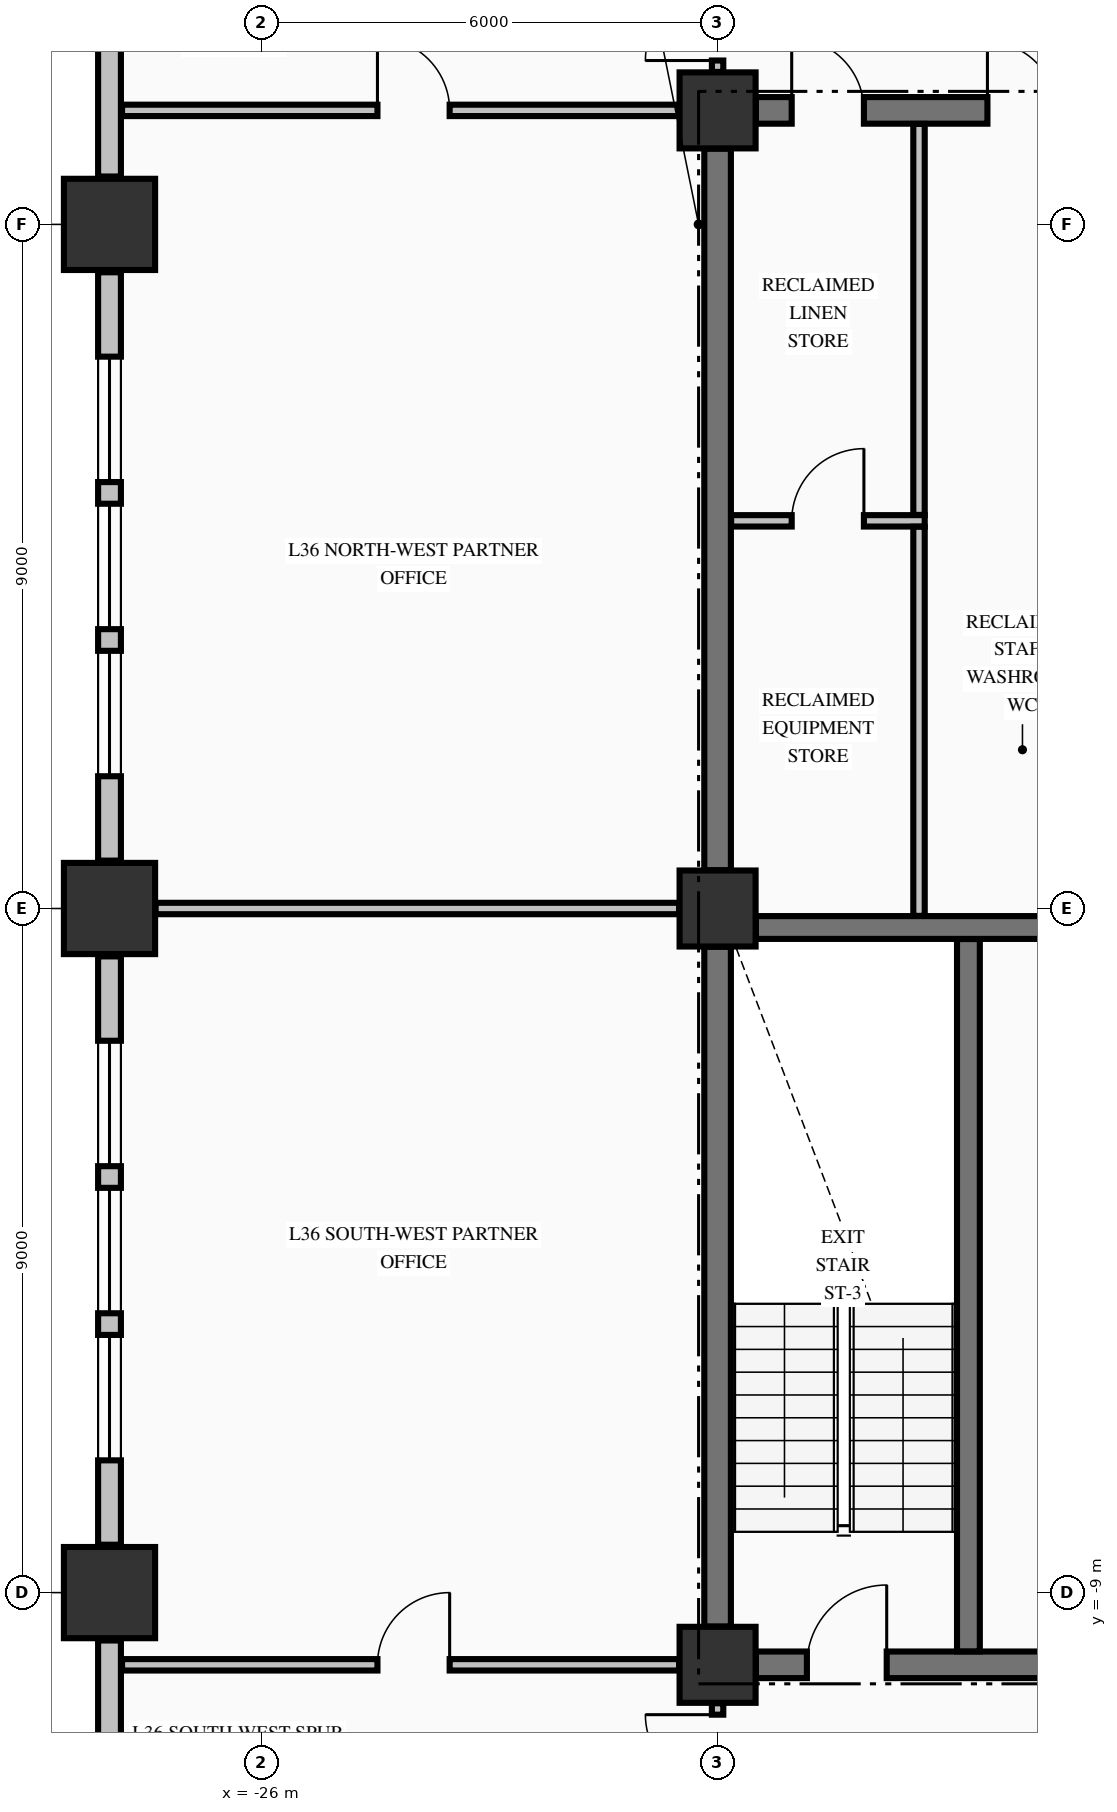
"""IFC4 building model, lengths in metres.
Left out: names, types, materials, properties, quantities, classifications, styles, units other than length and angle.
Written with IfcOpenShell. Run it as: python <this file> out.ifc"""

import sys

from ifc_helpers import new_model, si_unit, direction, frame, frame_2d, origin, origin_2d, place, context, subcontext, project, spatial, rectangle, extrude, element, fill, save


model = new_model("IFC4")
c1 = context("Model", 3, precision=1e-05, world=origin(), true_north=direction((0.0, 1.0)))
c2 = subcontext(c1, "Body", "Model", "MODEL_VIEW")
j1 = project(units=[si_unit("LENGTHUNIT", "METRE"), si_unit("PLANEANGLEUNIT", "RADIAN")], contexts=[c1])
p1 = place(None, origin())
s1 = spatial("IfcSite", under=j1, at=p1, CompositionType="ELEMENT")
p2 = place(p1, origin())
s2 = spatial("IfcBuilding", under=s1, at=p2, CompositionType="ELEMENT")
p3 = place(p2, frame((0.0, 0.0, 142.77)))
s3 = spatial("IfcBuildingStorey", under=s2, at=p3, CompositionType="ELEMENT", Elevation=142.77)
for number, where, z_axis, x_axis in (
    (1, (-28.0, -9.0, -0.325), (0.0, 0.0, 1.0), (1.0, 0.0, 0.0)),
    (2, (-28.0, 0.0, -0.325), (0.0, 0.0, 1.0), (1.0, 0.0, 0.0)),
    (3, (-28.0, 9.0, -0.325), (0.0, 0.0, 1.0), (1.0, 0.0, 0.0)),
):
    element("IfcColumn", number, at=place(p3, frame(where, z_axis=z_axis, x_axis=x_axis)), inside=s3, PredefinedType="COLUMN", context=c2, shape_type="SweptSolid", body=[
        extrude(rectangle(XDim=1.2, YDim=1.2, at=origin_2d()), origin(), (0.0, 0.0, 1.0), 3.645),
    ])
for number, where, z_axis, x_axis in (
    (4, (-20.0, -9.95, -0.325), (0.0, 0.0, 1.0), (1.0, 0.0, 0.0)),
    (5, (-20.0, 10.5, -0.325), (0.0, 0.0, 1.0), (1.0, 0.0, 0.0)),
    (6, (-20.0, 0.0, -0.325), (0.0, 0.0, 1.0), (1.0, 0.0, 0.0)),
):
    element("IfcColumn", number, at=place(p3, frame(where, z_axis=z_axis, x_axis=x_axis)), inside=s3, PredefinedType="COLUMN", context=c2, shape_type="SweptSolid", body=[
        extrude(rectangle(XDim=1.0, YDim=1.0, at=origin_2d()), origin(), (0.0, 0.0, 1.0), 3.645),
    ])
p4 = place(p3, frame((-28.0, -9.63, 0.0), z_axis=(0.0, 0.0, 1.0), x_axis=(0.0, -1.0, 0.0)))
e7 = element("IfcWall", 7, at=p4, inside=s3, PredefinedType="STANDARD", context=c2, shape_type="SweptSolid", body=[
    extrude(rectangle(XDim=10.74, YDim=0.3, at=frame_2d((5.37, 0.0))), origin(), (0.0, 0.0, 1.0), 2.712),
])
p5 = place(p3, frame((-28.0, -0.63, 0.0), z_axis=(0.0, 0.0, 1.0), x_axis=(0.0, -1.0, 0.0)))
e8 = element("IfcWall", 8, at=p5, inside=s3, PredefinedType="STANDARD", context=c2, shape_type="SweptSolid", body=[
    extrude(rectangle(XDim=7.74, YDim=0.3, at=frame_2d((3.87, 0.0))), origin(), (0.0, 0.0, 1.0), 2.712),
])
p6 = place(p5, frame((1.11, 0.0, 0.8)))
e9 = element("IfcOpeningElement", 9, at=p6, cuts=e8, PredefinedType="OPENING", context=c2, shape_type="SweptSolid", body=[
    extrude(rectangle(XDim=1.65, YDim=1.7, at=frame_2d((0.825, 0.85))), frame((0.0, 0.16, 0.0), z_axis=(0.0, -1.0, 0.0), x_axis=(1.0, 0.0, 0.0)), (0.0, 0.0, 1.0), 0.32),
])
p7 = place(p5, frame((3.045, 0.0, 0.8)))
e10 = element("IfcOpeningElement", 10, at=p7, cuts=e8, PredefinedType="OPENING", context=c2, shape_type="SweptSolid", body=[
    extrude(rectangle(XDim=1.65, YDim=1.7, at=frame_2d((0.825, 0.85))), frame((0.0, 0.16, 0.0), z_axis=(0.0, -1.0, 0.0), x_axis=(1.0, 0.0, 0.0)), (0.0, 0.0, 1.0), 0.32),
])
p8 = place(p5, frame((4.98, 0.0, 0.8)))
e11 = element("IfcOpeningElement", 11, at=p8, cuts=e8, PredefinedType="OPENING", context=c2, shape_type="SweptSolid", body=[
    extrude(rectangle(XDim=1.65, YDim=1.7, at=frame_2d((0.825, 0.85))), frame((0.0, 0.16, 0.0), z_axis=(0.0, -1.0, 0.0), x_axis=(1.0, 0.0, 0.0)), (0.0, 0.0, 1.0), 0.32),
])
p9 = place(p3, frame((-28.0, 8.37, 0.0), z_axis=(0.0, 0.0, 1.0), x_axis=(0.0, -1.0, 0.0)))
e12 = element("IfcWall", 12, at=p9, inside=s3, PredefinedType="STANDARD", context=c2, shape_type="SweptSolid", body=[
    extrude(rectangle(XDim=7.74, YDim=0.3, at=frame_2d((3.87, 0.0))), origin(), (0.0, 0.0, 1.0), 2.712),
])
p10 = place(p9, frame((1.11, 0.0, 0.8)))
e13 = element("IfcOpeningElement", 13, at=p10, cuts=e12, PredefinedType="OPENING", context=c2, shape_type="SweptSolid", body=[
    extrude(rectangle(XDim=1.65, YDim=1.7, at=frame_2d((0.825, 0.85))), frame((0.0, 0.16, 0.0), z_axis=(0.0, -1.0, 0.0), x_axis=(1.0, 0.0, 0.0)), (0.0, 0.0, 1.0), 0.32),
])
p11 = place(p9, frame((3.045, 0.0, 0.8)))
e14 = element("IfcOpeningElement", 14, at=p11, cuts=e12, PredefinedType="OPENING", context=c2, shape_type="SweptSolid", body=[
    extrude(rectangle(XDim=1.65, YDim=1.7, at=frame_2d((0.825, 0.85))), frame((0.0, 0.16, 0.0), z_axis=(0.0, -1.0, 0.0), x_axis=(1.0, 0.0, 0.0)), (0.0, 0.0, 1.0), 0.32),
])
p12 = place(p9, frame((4.98, 0.0, 0.8)))
e15 = element("IfcOpeningElement", 15, at=p12, cuts=e12, PredefinedType="OPENING", context=c2, shape_type="SweptSolid", body=[
    extrude(rectangle(XDim=1.65, YDim=1.7, at=frame_2d((0.825, 0.85))), frame((0.0, 0.16, 0.0), z_axis=(0.0, -1.0, 0.0), x_axis=(1.0, 0.0, 0.0)), (0.0, 0.0, 1.0), 0.32),
])
p13 = place(p3, frame((-28.0, 20.37, 0.0), z_axis=(0.0, 0.0, 1.0), x_axis=(0.0, -1.0, 0.0)))
e16 = element("IfcWall", 16, at=p13, inside=s3, PredefinedType="STANDARD", context=c2, shape_type="SweptSolid", body=[
    extrude(rectangle(XDim=10.74, YDim=0.3, at=frame_2d((5.37, 0.0))), origin(), (0.0, 0.0, 1.0), 2.712),
])
p14 = place(p3, frame((-19.496, -9.95, 0.0), z_axis=(0.0, 0.0, 1.0), x_axis=(1.0, 0.0, 0.0)))
e17 = element("IfcWall", 17, at=p14, inside=s3, PredefinedType="SHEAR", context=c2, shape_type="SweptSolid", body=[
    extrude(rectangle(XDim=4.796, YDim=0.35, at=frame_2d((2.398, 0.0))), origin(), (0.0, 0.0, 1.0), 3.32),
])
p15 = place(p14, frame((0.671, 0.0, 0.0)))
e18 = element("IfcOpeningElement", 18, at=p15, cuts=e17, PredefinedType="OPENING", context=c2, shape_type="SweptSolid", body=[
    extrude(rectangle(XDim=1.05, YDim=2.15, at=frame_2d((0.525, 1.075))), frame((0.0, 0.185, 0.0), z_axis=(0.0, -1.0, 0.0), x_axis=(1.0, 0.0, 0.0)), (0.0, 0.0, 1.0), 0.37),
])
p16 = place(p3, frame((-19.496, -0.25, 0.0), z_axis=(0.0, 0.0, 1.0), x_axis=(1.0, 0.0, 0.0)))
e19 = element("IfcWall", 19, at=p16, inside=s3, PredefinedType="SHEAR", context=c2, shape_type="SweptSolid", body=[
    extrude(rectangle(XDim=7.992, YDim=0.3, at=frame_2d((3.996, 0.0))), origin(), (0.0, 0.0, 1.0), 3.32),
])
p17 = place(p16, frame((5.796, 0.0, 0.0)))
e20 = element("IfcOpeningElement", 20, at=p17, cuts=e19, PredefinedType="OPENING", context=c2, shape_type="SweptSolid", body=[
    extrude(rectangle(XDim=1.1, YDim=2.15, at=frame_2d((0.55, 1.075))), frame((0.0, 0.16, 0.0), z_axis=(0.0, -1.0, 0.0), x_axis=(1.0, 0.0, 0.0)), (0.0, 0.0, 1.0), 0.32),
])
p18 = place(p3, frame((-19.496, 10.5, 0.0), z_axis=(0.0, 0.0, 1.0), x_axis=(1.0, 0.0, 0.0)))
e21 = element("IfcWall", 21, at=p18, inside=s3, PredefinedType="SHEAR", context=c2, shape_type="SweptSolid", body=[
    extrude(rectangle(XDim=4.796, YDim=0.35, at=frame_2d((2.398, 0.0))), origin(), (0.0, 0.0, 1.0), 3.32),
])
p19 = place(p18, frame((0.471, 0.0, 0.0)))
e22 = element("IfcOpeningElement", 22, at=p19, cuts=e21, PredefinedType="OPENING", context=c2, shape_type="SweptSolid", body=[
    extrude(rectangle(XDim=0.95, YDim=2.15, at=frame_2d((0.475, 1.075))), frame((0.0, 0.185, 0.0), z_axis=(0.0, -1.0, 0.0), x_axis=(1.0, 0.0, 0.0)), (0.0, 0.0, 1.0), 0.37),
])
p20 = place(p18, frame((3.046, 0.0, 0.0)))
e23 = element("IfcOpeningElement", 23, at=p20, cuts=e21, PredefinedType="OPENING", context=c2, shape_type="SweptSolid", body=[
    extrude(rectangle(XDim=0.9, YDim=2.15, at=frame_2d((0.45, 1.075))), frame((0.0, 0.185, 0.0), z_axis=(0.0, -1.0, 0.0), x_axis=(1.0, 0.0, 0.0)), (0.0, 0.0, 1.0), 0.37),
])
p21 = place(p3, frame((-27.835, -9.95, 0.0), z_axis=(0.0, 0.0, 1.0), x_axis=(1.0, 0.0, 0.0)))
e24 = element("IfcWall", 24, at=p21, inside=s3, PredefinedType="PARTITIONING", context=c2, shape_type="SweptSolid", body=[
    extrude(rectangle(XDim=7.329, YDim=0.15, at=frame_2d((3.665, 0.0))), origin(), (0.0, 0.0, 1.0), 3.32),
])
p22 = place(p21, frame((3.36, 0.0, 0.0)))
e25 = element("IfcOpeningElement", 25, at=p22, cuts=e24, PredefinedType="OPENING", context=c2, shape_type="SweptSolid", body=[
    extrude(rectangle(XDim=0.95, YDim=2.15, at=frame_2d((0.475, 1.075))), frame((0.0, 0.085, 0.0), z_axis=(0.0, -1.0, 0.0), x_axis=(1.0, 0.0, 0.0)), (0.0, 0.0, 1.0), 0.17),
])
p23 = place(p3, frame((-27.394, 0.0, 0.0), z_axis=(0.0, 0.0, 1.0), x_axis=(1.0, 0.0, 0.0)))
e26 = element("IfcWall", 26, at=p23, inside=s3, PredefinedType="PARTITIONING", context=c2, shape_type="SweptSolid", body=[
    extrude(rectangle(XDim=6.888, YDim=0.15, at=frame_2d((3.444, 0.0))), origin(), (0.0, 0.0, 1.0), 2.81),
])
p24 = place(p3, frame((-19.822, 5.1, 0.0), z_axis=(0.0, 0.0, 1.0), x_axis=(1.0, 0.0, 0.0)))
e27 = element("IfcWall", 27, at=p24, inside=s3, PredefinedType="PARTITIONING", context=c2, shape_type="SweptSolid", body=[
    extrude(rectangle(XDim=2.547, YDim=0.15, at=frame_2d((1.273, 0.0))), origin(), (0.0, 0.0, 1.0), 3.32),
])
p25 = place(p24, frame((0.797, 0.0, 0.0)))
e28 = element("IfcOpeningElement", 28, at=p25, cuts=e27, PredefinedType="OPENING", context=c2, shape_type="SweptSolid", body=[
    extrude(rectangle(XDim=0.95, YDim=2.15, at=frame_2d((0.475, 1.075))), frame((0.0, 0.085, 0.0), z_axis=(0.0, -1.0, 0.0), x_axis=(1.0, 0.0, 0.0)), (0.0, 0.0, 1.0), 0.17),
])
p26 = place(p3, frame((-27.835, 10.5, 0.0), z_axis=(0.0, 0.0, 1.0), x_axis=(1.0, 0.0, 0.0)))
e29 = element("IfcWall", 29, at=p26, inside=s3, PredefinedType="PARTITIONING", context=c2, shape_type="SweptSolid", body=[
    extrude(rectangle(XDim=7.329, YDim=0.15, at=frame_2d((3.665, 0.0))), origin(), (0.0, 0.0, 1.0), 3.32),
])
p27 = place(p26, frame((3.36, 0.0, 0.0)))
e30 = element("IfcOpeningElement", 30, at=p27, cuts=e29, PredefinedType="OPENING", context=c2, shape_type="SweptSolid", body=[
    extrude(rectangle(XDim=0.95, YDim=2.15, at=frame_2d((0.475, 1.075))), frame((0.0, 0.085, 0.0), z_axis=(0.0, -1.0, 0.0), x_axis=(1.0, 0.0, 0.0)), (0.0, 0.0, 1.0), 0.17),
])
p28 = place(p3, frame((-20.0, -9.446, 0.0), z_axis=(0.0, 0.0, 1.0), x_axis=(0.0, 1.0, 0.0)))
e31 = element("IfcWall", 31, at=p28, inside=s3, PredefinedType="SHEAR", context=c2, shape_type="SweptSolid", body=[
    extrude(rectangle(XDim=8.942, YDim=0.35, at=frame_2d((4.471, 0.0))), origin(), (0.0, 0.0, 1.0), 3.32),
])
p29 = place(p3, frame((-20.0, 0.504, 0.0), z_axis=(0.0, 0.0, 1.0), x_axis=(0.0, 1.0, 0.0)))
e32 = element("IfcWall", 32, at=p29, inside=s3, PredefinedType="SHEAR", context=c2, shape_type="SweptSolid", body=[
    extrude(rectangle(XDim=9.492, YDim=0.35, at=frame_2d((4.746, 0.0))), origin(), (0.0, 0.0, 1.0), 3.32),
])
p30 = place(p3, frame((-16.7, -9.773, 0.0), z_axis=(0.0, 0.0, 1.0), x_axis=(0.0, 1.0, 0.0)))
e33 = element("IfcWall", 33, at=p30, inside=s3, PredefinedType="SHEAR", context=c2, shape_type="SweptSolid", body=[
    extrude(rectangle(XDim=9.371, YDim=0.3, at=frame_2d((4.686, 0.0))), origin(), (0.0, 0.0, 1.0), 3.32),
])
p31 = place(p3, frame((-20.0, -12.122, 0.0), z_axis=(0.0, 0.0, 1.0), x_axis=(0.0, 1.0, 0.0)))
e34 = element("IfcWall", 34, at=p31, inside=s3, PredefinedType="PARTITIONING", context=c2, shape_type="SweptSolid", body=[
    extrude(rectangle(XDim=1.666, YDim=0.15, at=frame_2d((0.833, 0.0))), origin(), (0.0, 0.0, 1.0), 2.81),
])
p32 = place(p31, frame((0.566, 0.0, 0.0)))
e35 = element("IfcOpeningElement", 35, at=p32, cuts=e34, PredefinedType="OPENING", context=c2, shape_type="SweptSolid", body=[
    extrude(rectangle(XDim=0.95, YDim=2.15, at=frame_2d((0.475, 1.075))), frame((0.0, 0.085, 0.0), z_axis=(0.0, -1.0, 0.0), x_axis=(1.0, 0.0, 0.0)), (0.0, 0.0, 1.0), 0.17),
])
p33 = place(p3, frame((-20.0, 11.006, 0.0), z_axis=(0.0, 0.0, 1.0), x_axis=(0.0, 1.0, 0.0)))
e36 = element("IfcWall", 36, at=p33, inside=s3, PredefinedType="PARTITIONING", context=c2, shape_type="SweptSolid", body=[
    extrude(rectangle(XDim=1.466, YDim=0.15, at=frame_2d((0.733, 0.0))), origin(), (0.0, 0.0, 1.0), 2.81),
])
p34 = place(p33, frame((0.15, 0.0, 0.0)))
e37 = element("IfcOpeningElement", 37, at=p34, cuts=e36, PredefinedType="OPENING", context=c2, shape_type="SweptSolid", body=[
    extrude(rectangle(XDim=0.95, YDim=2.15, at=frame_2d((0.475, 1.075))), frame((0.0, 0.085, 0.0), z_axis=(0.0, -1.0, 0.0), x_axis=(1.0, 0.0, 0.0)), (0.0, 0.0, 1.0), 0.17),
])
p35 = place(p3, frame((-17.35, -0.097, 0.0), z_axis=(0.0, 0.0, 1.0), x_axis=(0.0, 1.0, 0.0)))
e38 = element("IfcWall", 38, at=p35, inside=s3, PredefinedType="PARTITIONING", context=c2, shape_type="SweptSolid", body=[
    extrude(rectangle(XDim=5.119, YDim=0.15, at=frame_2d((2.56, 0.0))), origin(), (0.0, 0.0, 1.0), 3.32),
])
p36 = place(p3, frame((-17.35, 5.178, 0.0), z_axis=(0.0, 0.0, 1.0), x_axis=(0.0, 1.0, 0.0)))
e39 = element("IfcWall", 39, at=p36, inside=s3, PredefinedType="PARTITIONING", context=c2, shape_type="SweptSolid", body=[
    extrude(rectangle(XDim=5.144, YDim=0.15, at=frame_2d((2.572, 0.0))), origin(), (0.0, 0.0, 1.0), 3.32),
])
p37 = place(p6, origin())
e40 = element("IfcWindow", 40, at=p37, inside=s3, PartitioningType="SINGLE_PANEL", PredefinedType="WINDOW", context=c2, shape_type="SweptSolid", body=[
    extrude(rectangle(XDim=1.65, YDim=1.7, at=frame_2d((0.825, 0.85))), frame((0.0, 0.03, 0.0), z_axis=(0.0, -1.0, 0.0), x_axis=(1.0, 0.0, 0.0)), (0.0, 0.0, 1.0), 0.06),
])
fill(e9, e40)
p38 = place(p7, origin())
e41 = element("IfcWindow", 41, at=p38, inside=s3, PartitioningType="SINGLE_PANEL", PredefinedType="WINDOW", context=c2, shape_type="SweptSolid", body=[
    extrude(rectangle(XDim=1.65, YDim=1.7, at=frame_2d((0.825, 0.85))), frame((0.0, 0.03, 0.0), z_axis=(0.0, -1.0, 0.0), x_axis=(1.0, 0.0, 0.0)), (0.0, 0.0, 1.0), 0.06),
])
fill(e10, e41)
p39 = place(p8, origin())
e42 = element("IfcWindow", 42, at=p39, inside=s3, PartitioningType="SINGLE_PANEL", PredefinedType="WINDOW", context=c2, shape_type="SweptSolid", body=[
    extrude(rectangle(XDim=1.65, YDim=1.7, at=frame_2d((0.825, 0.85))), frame((0.0, 0.03, 0.0), z_axis=(0.0, -1.0, 0.0), x_axis=(1.0, 0.0, 0.0)), (0.0, 0.0, 1.0), 0.06),
])
fill(e11, e42)
p40 = place(p10, origin())
e43 = element("IfcWindow", 43, at=p40, inside=s3, PartitioningType="SINGLE_PANEL", PredefinedType="WINDOW", context=c2, shape_type="SweptSolid", body=[
    extrude(rectangle(XDim=1.65, YDim=1.7, at=frame_2d((0.825, 0.85))), frame((0.0, 0.03, 0.0), z_axis=(0.0, -1.0, 0.0), x_axis=(1.0, 0.0, 0.0)), (0.0, 0.0, 1.0), 0.06),
])
fill(e13, e43)
p41 = place(p11, origin())
e44 = element("IfcWindow", 44, at=p41, inside=s3, PartitioningType="SINGLE_PANEL", PredefinedType="WINDOW", context=c2, shape_type="SweptSolid", body=[
    extrude(rectangle(XDim=1.65, YDim=1.7, at=frame_2d((0.825, 0.85))), frame((0.0, 0.03, 0.0), z_axis=(0.0, -1.0, 0.0), x_axis=(1.0, 0.0, 0.0)), (0.0, 0.0, 1.0), 0.06),
])
fill(e14, e44)
p42 = place(p12, origin())
e45 = element("IfcWindow", 45, at=p42, inside=s3, PartitioningType="SINGLE_PANEL", PredefinedType="WINDOW", context=c2, shape_type="SweptSolid", body=[
    extrude(rectangle(XDim=1.65, YDim=1.7, at=frame_2d((0.825, 0.85))), frame((0.0, 0.03, 0.0), z_axis=(0.0, -1.0, 0.0), x_axis=(1.0, 0.0, 0.0)), (0.0, 0.0, 1.0), 0.06),
])
fill(e15, e45)
p43 = place(p15, origin())
e46 = element("IfcDoor", 46, at=p43, inside=s3, OperationType="SINGLE_SWING_RIGHT", PredefinedType="DOOR", context=c2, shape_type="SweptSolid", body=[
    extrude(rectangle(XDim=1.05, YDim=2.15, at=frame_2d((0.525, 1.075))), frame((0.0, 0.025, 0.0), z_axis=(0.0, -1.0, 0.0), x_axis=(1.0, 0.0, 0.0)), (0.0, 0.0, 1.0), 0.05),
])
fill(e18, e46)
p44 = place(p19, origin())
e47 = element("IfcDoor", 47, at=p44, inside=s3, OperationType="SINGLE_SWING_LEFT", PredefinedType="DOOR", context=c2, shape_type="SweptSolid", body=[
    extrude(rectangle(XDim=0.95, YDim=2.15, at=frame_2d((0.475, 1.075))), frame((0.0, 0.025, 0.0), z_axis=(0.0, -1.0, 0.0), x_axis=(1.0, 0.0, 0.0)), (0.0, 0.0, 1.0), 0.05),
])
fill(e22, e47)
p45 = place(p25, origin())
e48 = element("IfcDoor", 48, at=p45, inside=s3, OperationType="SINGLE_SWING_RIGHT", PredefinedType="DOOR", context=c2, shape_type="SweptSolid", body=[
    extrude(rectangle(XDim=0.95, YDim=2.15, at=frame_2d((0.475, 1.075))), frame((0.0, 0.025, 0.0), z_axis=(0.0, -1.0, 0.0), x_axis=(1.0, 0.0, 0.0)), (0.0, 0.0, 1.0), 0.05),
])
fill(e28, e48)
p46 = place(p20, origin())
e49 = element("IfcDoor", 49, at=p46, inside=s3, OperationType="SINGLE_SWING_LEFT", PredefinedType="DOOR", context=c2, shape_type="SweptSolid", body=[
    extrude(rectangle(XDim=0.9, YDim=2.15, at=frame_2d((0.45, 1.075))), frame((0.0, 0.025, 0.0), z_axis=(0.0, -1.0, 0.0), x_axis=(1.0, 0.0, 0.0)), (0.0, 0.0, 1.0), 0.05),
])
fill(e23, e49)
p47 = place(p34, origin())
e50 = element("IfcDoor", 50, at=p47, inside=s3, OperationType="SINGLE_SWING_LEFT", PredefinedType="DOOR", context=c2, shape_type="SweptSolid", body=[
    extrude(rectangle(XDim=0.95, YDim=2.15, at=frame_2d((0.475, 1.075))), frame((0.0, 0.025, 0.0), z_axis=(0.0, -1.0, 0.0), x_axis=(1.0, 0.0, 0.0)), (0.0, 0.0, 1.0), 0.05),
])
fill(e37, e50)
p48 = place(p32, origin())
e51 = element("IfcDoor", 51, at=p48, inside=s3, OperationType="SINGLE_SWING_RIGHT", PredefinedType="DOOR", context=c2, shape_type="SweptSolid", body=[
    extrude(rectangle(XDim=0.95, YDim=2.15, at=frame_2d((0.475, 1.075))), frame((0.0, 0.025, 0.0), z_axis=(0.0, -1.0, 0.0), x_axis=(1.0, 0.0, 0.0)), (0.0, 0.0, 1.0), 0.05),
])
fill(e35, e51)
p49 = place(p27, origin())
e52 = element("IfcDoor", 52, at=p49, inside=s3, OperationType="SINGLE_SWING_LEFT", PredefinedType="DOOR", context=c2, shape_type="SweptSolid", body=[
    extrude(rectangle(XDim=0.95, YDim=2.15, at=frame_2d((0.475, 1.075))), frame((0.0, 0.025, 0.0), z_axis=(0.0, -1.0, 0.0), x_axis=(1.0, 0.0, 0.0)), (0.0, 0.0, 1.0), 0.05),
])
fill(e30, e52)
p50 = place(p22, origin())
e53 = element("IfcDoor", 53, at=p50, inside=s3, OperationType="SINGLE_SWING_RIGHT", PredefinedType="DOOR", context=c2, shape_type="SweptSolid", body=[
    extrude(rectangle(XDim=0.95, YDim=2.15, at=frame_2d((0.475, 1.075))), frame((0.0, 0.025, 0.0), z_axis=(0.0, -1.0, 0.0), x_axis=(1.0, 0.0, 0.0)), (0.0, 0.0, 1.0), 0.05),
])
fill(e25, e53)
save(model, sys.argv[1])
